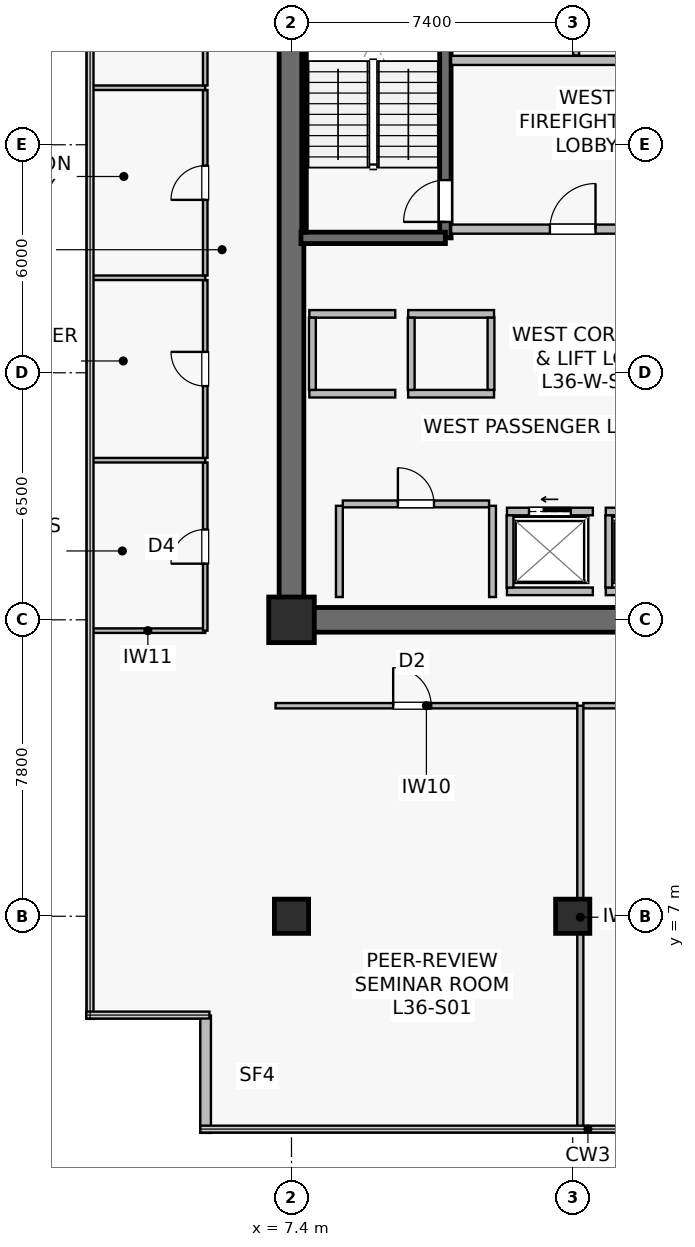
"""IFC4 building model, lengths in metres.
Left out: names, types, materials, properties, quantities, classifications, styles, units other than length and angle.
Written with IfcOpenShell. Run it as: python <this file> out.ifc"""

import sys

from ifc_helpers import new_model, si_unit, direction, frame, frame_2d, origin, origin_2d, place, context, subcontext, project, spatial, rectangle, extrude, source, transform, mapped, element, fill, save


model = new_model("IFC4")
c1 = context("Model", 3, precision=1e-05, world=origin(), true_north=direction((0.0, 1.0)))
c2 = subcontext(c1, "Body", "Model", "MODEL_VIEW")
j1 = project(units=[si_unit("LENGTHUNIT", "METRE"), si_unit("PLANEANGLEUNIT", "RADIAN")], contexts=[c1])
p1 = place(None, origin())
s1 = spatial("IfcSite", under=j1, at=p1, CompositionType="ELEMENT")
p2 = place(p1, origin())
s2 = spatial("IfcBuilding", under=s1, at=p2, CompositionType="ELEMENT")
p3 = place(p2, frame((0.0, 0.0, 150.2)))
s3 = spatial("IfcBuildingStorey", under=s2, at=p3, CompositionType="ELEMENT", Elevation=150.2)
p4 = place(p3, frame((7.075, 14.8, 0.0), z_axis=(0.0, 0.0, 1.0), x_axis=(1.0, 0.0, 0.0)))
e1 = element("IfcWall", 1, at=p4, inside=s3, PredefinedType="SHEAR", context=c2, shape_type="SweptSolid", body=[
    extrude(rectangle(XDim=15.45, YDim=0.65, at=frame_2d((7.725, 0.0))), origin(), (0.0, 0.0, 1.0), 3.79),
])
p5 = place(p3, frame((7.4, 15.125, 0.0), z_axis=(0.0, 0.0, 1.0), x_axis=(0.0, 1.0, 0.0)))
e2 = element("IfcWall", 2, at=p5, inside=s3, PredefinedType="SHEAR", context=c2, shape_type="SweptSolid", body=[
    extrude(rectangle(XDim=18.35, YDim=0.65, at=frame_2d((9.175, 0.0))), origin(), (0.0, 0.0, 1.0), 3.79),
])
p6 = place(p3, frame((11.45, 24.85, 0.0), z_axis=(0.0, 0.0, 1.0), x_axis=(0.0, 1.0, 0.0)))
e3 = element("IfcWall", 3, at=p6, inside=s3, PredefinedType="SHEAR", context=c2, shape_type="SweptSolid", body=[
    extrude(rectangle(XDim=8.63, YDim=0.3, at=frame_2d((4.315, 0.0))), origin(), (0.0, 0.0, 1.0), 3.79),
])
p7 = place(p6, frame((0.42, 0.0, 0.0)))
e4 = element("IfcOpeningElement", 4, at=p7, cuts=e3, PredefinedType="OPENING", context=c2, shape_type="SweptSolid", body=[
    extrude(rectangle(XDim=1.1, YDim=2.15, at=frame_2d((0.55, 1.075))), frame((0.0, 0.16, 0.0), z_axis=(0.0, -1.0, 0.0), x_axis=(1.0, 0.0, 0.0)), (0.0, 0.0, 1.0), 0.32),
])
p8 = place(p3, frame((7.65, 24.85, 0.0), z_axis=(0.0, 0.0, 1.0), x_axis=(1.0, 0.0, 0.0)))
e5 = element("IfcWall", 5, at=p8, inside=s3, PredefinedType="SHEAR", context=c2, shape_type="SweptSolid", body=[
    extrude(rectangle(XDim=3.8, YDim=0.3, at=frame_2d((1.9, 0.0))), origin(), (0.0, 0.0, 1.0), 3.79),
])
p9 = place(p3, frame((7.73, 25.0, 0.0), z_axis=(0.0, 0.0, 1.0), x_axis=(0.0, 1.0, 0.0)))
e6 = element("IfcWall", 6, at=p9, inside=s3, PredefinedType="SOLIDWALL", context=c2, shape_type="SweptSolid", body=[
    extrude(rectangle(XDim=8.32, YDim=0.12, at=frame_2d((4.16, 0.0))), origin(), (0.0, 0.0, 1.0), 3.79),
])
m1 = source(origin(), c2, "Body", "SweptSolid", [
    extrude(rectangle(XDim=0.9, YDim=0.9, at=origin_2d()), origin(), (0.0, 0.0, 1.0), 4.1),
])
p10 = place(p3, frame((14.8, 7.0, 0.0), z_axis=(0.0, 0.0, 1.0), x_axis=(1.0, 0.0, 0.0)))
e7 = element("IfcColumn", 7, at=p10, inside=s3, PredefinedType="COLUMN", context=c2, shape_type="MappedRepresentation", body=[
    mapped(m1, transform((0.0, 0.0, 0.0), scale=1.0)),
])
m2 = source(origin(), c2, "Body", "SweptSolid", [
    extrude(rectangle(XDim=1.2, YDim=1.2, at=origin_2d()), origin(), (0.0, 0.0, 1.0), 4.1),
])
p11 = place(p3, frame((7.4, 14.8, 0.0), z_axis=(0.0, 0.0, 1.0), x_axis=(1.0, 0.0, 0.0)))
e8 = element("IfcColumn", 8, at=p11, inside=s3, PredefinedType="COLUMN", context=c2, shape_type="MappedRepresentation", body=[
    mapped(m2, transform((0.0, 0.0, 0.0), scale=1.0)),
])
p12 = place(p3, frame((7.4, 7.0, 0.0), z_axis=(0.0, 0.0, 1.0), x_axis=(1.0, 0.0, 0.0)))
e9 = element("IfcColumn", 9, at=p12, inside=s3, PredefinedType="COLUMN", context=c2, shape_type="MappedRepresentation", body=[
    mapped(m1, transform((0.0, 0.0, 0.0), scale=1.0)),
])
p13 = place(p3, frame((5.14, 4.388, 0.0), z_axis=(0.0, 0.0, 1.0), x_axis=(0.0, -1.0, 0.0)))
e10 = element("IfcWall", 10, at=p13, inside=s3, PredefinedType="STANDARD", context=c2, shape_type="SweptSolid", body=[
    extrude(rectangle(XDim=3.088, YDim=0.28, at=frame_2d((1.544, 0.0))), origin(), (0.0, 0.0, 1.0), 3.79),
])
p14 = place(p3, frame((11.6, 25.08, 0.0), z_axis=(0.0, 0.0, 1.0), x_axis=(1.0, 0.0, 0.0)))
e11 = element("IfcWall", 11, at=p14, inside=s3, PredefinedType="SOLIDWALL", context=c2, shape_type="SweptSolid", body=[
    extrude(rectangle(XDim=6.92, YDim=0.24, at=frame_2d((3.46, 0.0))), origin(), (0.0, 0.0, 1.0), 3.187),
])
p15 = place(p14, frame((2.6, 0.0, 0.0)))
e12 = element("IfcOpeningElement", 12, at=p15, cuts=e11, PredefinedType="OPENING", context=c2, shape_type="SweptSolid", body=[
    extrude(rectangle(XDim=1.2, YDim=2.16, at=frame_2d((0.6, 1.08))), frame((0.0, 0.13, 0.0), z_axis=(0.0, -1.0, 0.0), x_axis=(1.0, 0.0, 0.0)), (0.0, 0.0, 1.0), 0.26),
])
p16 = place(p3, frame((11.6, 29.52, 0.0), z_axis=(0.0, 0.0, 1.0), x_axis=(1.0, 0.0, 0.0)))
e13 = element("IfcWall", 13, at=p16, inside=s3, PredefinedType="SOLIDWALL", context=c2, shape_type="SweptSolid", body=[
    extrude(rectangle(XDim=6.92, YDim=0.24, at=frame_2d((3.46, 0.0))), origin(), (0.0, 0.0, 1.0), 3.187),
])
p17 = place(p3, frame((13.07, 17.65, 0.0), z_axis=(0.0, 0.0, 1.0), x_axis=(1.0, 0.0, 0.0)))
e14 = element("IfcWall", 14, at=p17, inside=s3, PredefinedType="SOLIDWALL", context=c2, shape_type="SweptSolid", body=[
    extrude(rectangle(XDim=2.26, YDim=0.2, at=frame_2d((1.13, 0.0))), origin(), (0.0, 0.0, 1.0), 3.187),
])
p18 = place(p17, frame((0.58, 0.0, 0.0)))
e15 = element("IfcOpeningElement", 15, at=p18, cuts=e14, PredefinedType="OPENING", context=c2, shape_type="SweptSolid", body=[
    extrude(rectangle(XDim=1.1, YDim=2.22, at=frame_2d((0.55, 1.11))), frame((0.0, 0.11, 0.0), z_axis=(0.0, -1.0, 0.0), x_axis=(1.0, 0.0, 0.0)), (0.0, 0.0, 1.0), 0.22),
])
p19 = place(p3, frame((13.07, 15.55, 0.0), z_axis=(0.0, 0.0, 1.0), x_axis=(1.0, 0.0, 0.0)))
e16 = element("IfcWall", 16, at=p19, inside=s3, PredefinedType="SOLIDWALL", context=c2, shape_type="SweptSolid", body=[
    extrude(rectangle(XDim=2.26, YDim=0.2, at=frame_2d((1.13, 0.0))), origin(), (0.0, 0.0, 1.0), 3.187),
])
p20 = place(p3, frame((13.15, 15.65, 0.0), z_axis=(0.0, 0.0, 1.0), x_axis=(0.0, 1.0, 0.0)))
e17 = element("IfcWall", 17, at=p20, inside=s3, PredefinedType="SOLIDWALL", context=c2, shape_type="SweptSolid", body=[
    extrude(rectangle(XDim=1.9, YDim=0.18, at=frame_2d((0.95, 0.0))), origin(), (0.0, 0.0, 1.0), 3.79),
])
p21 = place(p3, frame((15.67, 17.65, 0.0), z_axis=(0.0, 0.0, 1.0), x_axis=(1.0, 0.0, 0.0)))
e18 = element("IfcWall", 18, at=p21, inside=s3, PredefinedType="SOLIDWALL", context=c2, shape_type="SweptSolid", body=[
    extrude(rectangle(XDim=2.26, YDim=0.2, at=frame_2d((1.13, 0.0))), origin(), (0.0, 0.0, 1.0), 3.79),
])
p22 = place(p21, frame((0.58, 0.0, 0.0)))
e19 = element("IfcOpeningElement", 19, at=p22, cuts=e18, PredefinedType="OPENING", context=c2, shape_type="SweptSolid", body=[
    extrude(rectangle(XDim=1.1, YDim=2.22, at=frame_2d((0.55, 1.11))), frame((0.0, 0.11, 0.0), z_axis=(0.0, -1.0, 0.0), x_axis=(1.0, 0.0, 0.0)), (0.0, 0.0, 1.0), 0.22),
])
p23 = place(p3, frame((15.67, 15.55, 0.0), z_axis=(0.0, 0.0, 1.0), x_axis=(1.0, 0.0, 0.0)))
e20 = element("IfcWall", 20, at=p23, inside=s3, PredefinedType="SOLIDWALL", context=c2, shape_type="SweptSolid", body=[
    extrude(rectangle(XDim=2.26, YDim=0.2, at=frame_2d((1.13, 0.0))), origin(), (0.0, 0.0, 1.0), 3.79),
])
p24 = place(p3, frame((15.75, 15.65, 0.0), z_axis=(0.0, 0.0, 1.0), x_axis=(0.0, 1.0, 0.0)))
e21 = element("IfcWall", 21, at=p24, inside=s3, PredefinedType="SOLIDWALL", context=c2, shape_type="SweptSolid", body=[
    extrude(rectangle(XDim=1.9, YDim=0.18, at=frame_2d((0.95, 0.0))), origin(), (0.0, 0.0, 1.0), 3.79),
])
for number, where, z_axis, x_axis in (
    (22, (7.87, 20.75, 0.0), (0.0, 0.0, 1.0), (1.0, 0.0, 0.0)),
    (23, (7.87, 22.85, 0.0), (0.0, 0.0, 1.0), (1.0, 0.0, 0.0)),
):
    element("IfcWall", number, at=place(p3, frame(where, z_axis=z_axis, x_axis=x_axis)), inside=s3, PredefinedType="SOLIDWALL", context=c2, shape_type="SweptSolid", body=[
        extrude(rectangle(XDim=2.26, YDim=0.2, at=frame_2d((1.13, 0.0))), origin(), (0.0, 0.0, 1.0), 3.79),
    ])
p25 = place(p3, frame((7.95, 20.85, 0.0), z_axis=(0.0, 0.0, 1.0), x_axis=(0.0, 1.0, 0.0)))
e24 = element("IfcWall", 24, at=p25, inside=s3, PredefinedType="SOLIDWALL", context=c2, shape_type="SweptSolid", body=[
    extrude(rectangle(XDim=1.9, YDim=0.18, at=frame_2d((0.95, 0.0))), origin(), (0.0, 0.0, 1.0), 3.79),
])
for number, where, z_axis, x_axis in (
    (25, (10.47, 20.75, 0.0), (0.0, 0.0, 1.0), (1.0, 0.0, 0.0)),
    (26, (10.47, 22.85, 0.0), (0.0, 0.0, 1.0), (1.0, 0.0, 0.0)),
):
    element("IfcWall", number, at=place(p3, frame(where, z_axis=z_axis, x_axis=x_axis)), inside=s3, PredefinedType="SOLIDWALL", context=c2, shape_type="SweptSolid", body=[
        extrude(rectangle(XDim=2.26, YDim=0.2, at=frame_2d((1.13, 0.0))), origin(), (0.0, 0.0, 1.0), 3.79),
    ])
for number, where, z_axis, x_axis in (
    (27, (10.55, 20.85, 0.0), (0.0, 0.0, 1.0), (0.0, 1.0, 0.0)),
    (28, (12.65, 20.85, 0.0), (0.0, 0.0, 1.0), (0.0, 1.0, 0.0)),
):
    element("IfcWall", number, at=place(p3, frame(where, z_axis=z_axis, x_axis=x_axis)), inside=s3, PredefinedType="SOLIDWALL", context=c2, shape_type="SweptSolid", body=[
        extrude(rectangle(XDim=1.9, YDim=0.18, at=frame_2d((0.95, 0.0))), origin(), (0.0, 0.0, 1.0), 3.79),
    ])
p26 = place(p3, frame((8.75, 17.85, 0.0), z_axis=(0.0, 0.0, 1.0), x_axis=(1.0, 0.0, 0.0)))
e29 = element("IfcWall", 29, at=p26, inside=s3, PredefinedType="SOLIDWALL", context=c2, shape_type="SweptSolid", body=[
    extrude(rectangle(XDim=3.85, YDim=0.18, at=frame_2d((1.925, 0.0))), origin(), (0.0, 0.0, 1.0), 3.79),
])
p27 = place(p26, frame((1.45, 0.0, 0.0)))
e30 = element("IfcOpeningElement", 30, at=p27, cuts=e29, PredefinedType="OPENING", context=c2, shape_type="SweptSolid", body=[
    extrude(rectangle(XDim=0.95, YDim=2.15, at=frame_2d((0.475, 1.075))), frame((0.0, 0.1, 0.0), z_axis=(0.0, -1.0, 0.0), x_axis=(1.0, 0.0, 0.0)), (0.0, 0.0, 1.0), 0.2),
])
for number, where, z_axis, x_axis in (
    (31, (12.69, 15.4, 0.0), (0.0, 0.0, 1.0), (0.0, 1.0, 0.0)),
    (32, (8.66, 15.4, 0.0), (0.0, 0.0, 1.0), (0.0, 1.0, 0.0)),
):
    element("IfcWall", number, at=place(p3, frame(where, z_axis=z_axis, x_axis=x_axis)), inside=s3, PredefinedType="SOLIDWALL", context=c2, shape_type="SweptSolid", body=[
        extrude(rectangle(XDim=2.4, YDim=0.18, at=frame_2d((1.2, 0.0))), origin(), (0.0, 0.0, 1.0), 3.79),
    ])
p28 = place(p3, frame((14.89, 29.65, 0.0), z_axis=(0.0, 0.0, 1.0), x_axis=(0.0, 1.0, 0.0)))
e33 = element("IfcWall", 33, at=p28, inside=s3, PredefinedType="PLUMBINGWALL", context=c2, shape_type="SweptSolid", body=[
    extrude(rectangle(XDim=3.93, YDim=0.155, at=frame_2d((1.965, 0.0))), origin(), (0.0, 0.0, 1.0), 3.187),
])
p29 = place(p3, frame((6.98, 12.54, 0.0), z_axis=(0.0, 0.0, 1.0), x_axis=(1.0, 0.0, 0.0)))
e34 = element("IfcWall", 34, at=p29, inside=s3, PredefinedType="PARTITIONING", context=c2, shape_type="SweptSolid", body=[
    extrude(rectangle(XDim=7.94, YDim=0.14, at=frame_2d((3.97, 0.0))), origin(), (0.0, 0.0, 1.0), 3.187),
])
p30 = place(p29, frame((3.096, 0.0, 0.0)))
e35 = element("IfcOpeningElement", 35, at=p30, cuts=e34, PredefinedType="OPENING", context=c2, shape_type="SweptSolid", body=[
    extrude(rectangle(XDim=1.0, YDim=2.15, at=frame_2d((0.5, 1.075))), frame((0.0, 0.08, 0.0), z_axis=(0.0, -1.0, 0.0), x_axis=(1.0, 0.0, 0.0)), (0.0, 0.0, 1.0), 0.16),
])
p31 = place(p3, frame((15.0, 1.41, 0.0), z_axis=(0.0, 0.0, 1.0), x_axis=(0.0, 1.0, 0.0)))
e36 = element("IfcWall", 36, at=p31, inside=s3, PredefinedType="PARTITIONING", context=c2, shape_type="SweptSolid", body=[
    extrude(rectangle(XDim=11.13, YDim=0.16, at=frame_2d((5.565, 0.0))), origin(), (0.0, 0.0, 1.0), 3.075),
])
p32 = place(p3, frame((15.08, 12.54, 0.0), z_axis=(0.0, 0.0, 1.0), x_axis=(1.0, 0.0, 0.0)))
e37 = element("IfcWall", 37, at=p32, inside=s3, PredefinedType="PARTITIONING", context=c2, shape_type="SweptSolid", body=[
    extrude(rectangle(XDim=14.44, YDim=0.14, at=frame_2d((7.22, 0.0))), origin(), (0.0, 0.0, 1.0), 3.187),
])
p33 = place(p32, frame((7.428, 0.0, 0.0)))
e38 = element("IfcOpeningElement", 38, at=p33, cuts=e37, PredefinedType="OPENING", context=c2, shape_type="SweptSolid", body=[
    extrude(rectangle(XDim=1.1, YDim=2.18, at=frame_2d((0.55, 1.09))), frame((0.0, 0.08, 0.0), z_axis=(0.0, -1.0, 0.0), x_axis=(1.0, 0.0, 0.0)), (0.0, 0.0, 1.0), 0.16),
])
p34 = place(p3, frame((2.11, 14.515, 0.0), z_axis=(0.0, 0.0, 1.0), x_axis=(1.0, 0.0, 0.0)))
e39 = element("IfcWall", 39, at=p34, inside=s3, PredefinedType="PARTITIONING", context=c2, shape_type="SweptSolid", body=[
    extrude(rectangle(XDim=3.02, YDim=0.12, at=frame_2d((1.51, 0.0))), origin(), (0.0, 0.0, 1.0), 3.79),
])
p35 = place(p3, frame((5.13, 14.515, 0.0), z_axis=(0.0, 0.0, 1.0), x_axis=(0.0, 1.0, 0.0)))
e40 = element("IfcWall", 40, at=p35, inside=s3, PredefinedType="PARTITIONING", context=c2, shape_type="SweptSolid", body=[
    extrude(rectangle(XDim=4.425, YDim=0.12, at=frame_2d((2.212, 0.0))), origin(), (0.0, 0.0, 1.0), 3.79),
])
p36 = place(p35, frame((1.762, 0.0, 0.0)))
e41 = element("IfcOpeningElement", 41, at=p36, cuts=e40, PredefinedType="OPENING", context=c2, shape_type="SweptSolid", body=[
    extrude(rectangle(XDim=0.9, YDim=2.1, at=frame_2d((0.45, 1.05))), frame((0.0, 0.07, 0.0), z_axis=(0.0, -1.0, 0.0), x_axis=(1.0, 0.0, 0.0)), (0.0, 0.0, 1.0), 0.14),
])
p37 = place(p3, frame((2.11, 19.0, 0.0), z_axis=(0.0, 0.0, 1.0), x_axis=(1.0, 0.0, 0.0)))
e42 = element("IfcWall", 42, at=p37, inside=s3, PredefinedType="PARTITIONING", context=c2, shape_type="SweptSolid", body=[
    extrude(rectangle(XDim=3.02, YDim=0.12, at=frame_2d((1.51, 0.0))), origin(), (0.0, 0.0, 1.0), 3.79),
])
p38 = place(p3, frame((5.13, 19.06, 0.0), z_axis=(0.0, 0.0, 1.0), x_axis=(0.0, 1.0, 0.0)))
e43 = element("IfcWall", 43, at=p38, inside=s3, PredefinedType="PARTITIONING", context=c2, shape_type="SweptSolid", body=[
    extrude(rectangle(XDim=4.68, YDim=0.12, at=frame_2d((2.34, 0.0))), origin(), (0.0, 0.0, 1.0), 3.79),
])
p39 = place(p38, frame((1.89, 0.0, 0.0)))
e44 = element("IfcOpeningElement", 44, at=p39, cuts=e43, PredefinedType="OPENING", context=c2, shape_type="SweptSolid", body=[
    extrude(rectangle(XDim=0.9, YDim=2.1, at=frame_2d((0.45, 1.05))), frame((0.0, 0.07, 0.0), z_axis=(0.0, -1.0, 0.0), x_axis=(1.0, 0.0, 0.0)), (0.0, 0.0, 1.0), 0.14),
])
p40 = place(p3, frame((2.11, 23.8, 0.0), z_axis=(0.0, 0.0, 1.0), x_axis=(1.0, 0.0, 0.0)))
e45 = element("IfcWall", 45, at=p40, inside=s3, PredefinedType="PARTITIONING", context=c2, shape_type="SweptSolid", body=[
    extrude(rectangle(XDim=3.02, YDim=0.12, at=frame_2d((1.51, 0.0))), origin(), (0.0, 0.0, 1.0), 3.79),
])
p41 = place(p3, frame((5.13, 23.86, 0.0), z_axis=(0.0, 0.0, 1.0), x_axis=(0.0, 1.0, 0.0)))
e46 = element("IfcWall", 46, at=p41, inside=s3, PredefinedType="PARTITIONING", context=c2, shape_type="SweptSolid", body=[
    extrude(rectangle(XDim=4.88, YDim=0.12, at=frame_2d((2.44, 0.0))), origin(), (0.0, 0.0, 1.0), 3.79),
])
p42 = place(p41, frame((1.99, 0.0, 0.0)))
e47 = element("IfcOpeningElement", 47, at=p42, cuts=e46, PredefinedType="OPENING", context=c2, shape_type="SweptSolid", body=[
    extrude(rectangle(XDim=0.9, YDim=2.1, at=frame_2d((0.45, 1.05))), frame((0.0, 0.07, 0.0), z_axis=(0.0, -1.0, 0.0), x_axis=(1.0, 0.0, 0.0)), (0.0, 0.0, 1.0), 0.14),
])
p43 = place(p3, frame((2.11, 28.8, 0.0), z_axis=(0.0, 0.0, 1.0), x_axis=(1.0, 0.0, 0.0)))
e48 = element("IfcWall", 48, at=p43, inside=s3, PredefinedType="PARTITIONING", context=c2, shape_type="SweptSolid", body=[
    extrude(rectangle(XDim=3.02, YDim=0.12, at=frame_2d((1.51, 0.0))), origin(), (0.0, 0.0, 1.0), 3.79),
])
p44 = place(p3, frame((5.13, 28.86, 0.0), z_axis=(0.0, 0.0, 1.0), x_axis=(0.0, 1.0, 0.0)))
e49 = element("IfcWall", 49, at=p44, inside=s3, PredefinedType="PARTITIONING", context=c2, shape_type="SweptSolid", body=[
    extrude(rectangle(XDim=5.225, YDim=0.12, at=frame_2d((2.612, 0.0))), origin(), (0.0, 0.0, 1.0), 3.79),
])
p45 = place(p44, frame((2.163, 0.0, 0.0)))
e50 = element("IfcOpeningElement", 50, at=p45, cuts=e49, PredefinedType="OPENING", context=c2, shape_type="SweptSolid", body=[
    extrude(rectangle(XDim=0.9, YDim=2.1, at=frame_2d((0.45, 1.05))), frame((0.0, 0.07, 0.0), z_axis=(0.0, -1.0, 0.0), x_axis=(1.0, 0.0, 0.0)), (0.0, 0.0, 1.0), 0.14),
])
m3 = source(origin(), c2, "Body", "SweptSolid", [
    extrude(rectangle(XDim=1.1, YDim=2.15, at=frame_2d((0.55, 1.075))), frame((0.0, 0.025, 0.0), z_axis=(0.0, -1.0, 0.0), x_axis=(1.0, 0.0, 0.0)), (0.0, 0.0, 1.0), 0.05),
])
p46 = place(p7, origin())
e51 = element("IfcDoor", 51, at=p46, inside=s3, OperationType="SINGLE_SWING_LEFT", PredefinedType="DOOR", context=c2, shape_type="MappedRepresentation", body=[
    mapped(m3, transform((0.0, 0.0, 0.0), scale=1.0)),
])
fill(e4, e51)
m4 = source(origin(), c2, "Body", "SweptSolid", [
    extrude(rectangle(XDim=1.2, YDim=2.16, at=frame_2d((0.6, 1.08))), frame((0.0, 0.025, 0.0), z_axis=(0.0, -1.0, 0.0), x_axis=(1.0, 0.0, 0.0)), (0.0, 0.0, 1.0), 0.05),
])
p47 = place(p15, origin())
e52 = element("IfcDoor", 52, at=p47, inside=s3, OperationType="SINGLE_SWING_RIGHT", PredefinedType="DOOR", context=c2, shape_type="MappedRepresentation", body=[
    mapped(m4, transform((0.0, 0.0, 0.0), scale=1.0)),
])
fill(e12, e52)
m5 = source(origin(), c2, "Body", "SweptSolid", [
    extrude(rectangle(XDim=1.1, YDim=2.22, at=frame_2d((0.55, 1.11))), frame((0.0, 0.025, 0.0), z_axis=(0.0, -1.0, 0.0), x_axis=(1.0, 0.0, 0.0)), (0.0, 0.0, 1.0), 0.05),
])
p48 = place(p18, origin())
e53 = element("IfcDoor", 53, at=p48, inside=s3, OperationType="SLIDING_TO_LEFT", PredefinedType="USERDEFINED", context=c2, shape_type="MappedRepresentation", body=[
    mapped(m5, transform((0.0, 0.0, 0.0), scale=1.0)),
])
fill(e15, e53)
m6 = source(origin(), c2, "Body", "SweptSolid", [
    extrude(rectangle(XDim=0.95, YDim=2.15, at=frame_2d((0.475, 1.075))), frame((0.0, 0.025, 0.0), z_axis=(0.0, -1.0, 0.0), x_axis=(1.0, 0.0, 0.0)), (0.0, 0.0, 1.0), 0.05),
])
p49 = place(p27, origin())
e54 = element("IfcDoor", 54, at=p49, inside=s3, OperationType="SINGLE_SWING_LEFT", PredefinedType="DOOR", context=c2, shape_type="MappedRepresentation", body=[
    mapped(m6, transform((0.0, 0.0, 0.0), scale=1.0)),
])
fill(e30, e54)
m7 = source(origin(), c2, "Body", "SweptSolid", [
    extrude(rectangle(XDim=1.0, YDim=2.15, at=frame_2d((0.5, 1.075))), frame((0.0, 0.025, 0.0), z_axis=(0.0, -1.0, 0.0), x_axis=(1.0, 0.0, 0.0)), (0.0, 0.0, 1.0), 0.05),
])
p50 = place(p30, origin())
e55 = element("IfcDoor", 55, at=p50, inside=s3, OperationType="SINGLE_SWING_LEFT", PredefinedType="DOOR", context=c2, shape_type="MappedRepresentation", body=[
    mapped(m7, transform((0.0, 0.0, 0.0), scale=1.0)),
])
fill(e35, e55)
m8 = source(origin(), c2, "Body", "SweptSolid", [
    extrude(rectangle(XDim=0.9, YDim=2.1, at=frame_2d((0.45, 1.05))), frame((0.0, 0.025, 0.0), z_axis=(0.0, -1.0, 0.0), x_axis=(1.0, 0.0, 0.0)), (0.0, 0.0, 1.0), 0.05),
])
p51 = place(p36, origin())
e56 = element("IfcDoor", 56, at=p51, inside=s3, OperationType="SINGLE_SWING_LEFT", PredefinedType="DOOR", context=c2, shape_type="MappedRepresentation", body=[
    mapped(m8, transform((0.0, 0.0, 0.0), scale=1.0)),
])
fill(e41, e56)
p52 = place(p39, origin())
e57 = element("IfcDoor", 57, at=p52, inside=s3, OperationType="SINGLE_SWING_RIGHT", PredefinedType="DOOR", context=c2, shape_type="MappedRepresentation", body=[
    mapped(m8, transform((0.0, 0.0, 0.0), scale=1.0)),
])
fill(e44, e57)
p53 = place(p42, origin())
e58 = element("IfcDoor", 58, at=p53, inside=s3, OperationType="SINGLE_SWING_LEFT", PredefinedType="DOOR", context=c2, shape_type="MappedRepresentation", body=[
    mapped(m8, transform((0.0, 0.0, 0.0), scale=1.0)),
])
fill(e47, e58)
save(model, sys.argv[1])
